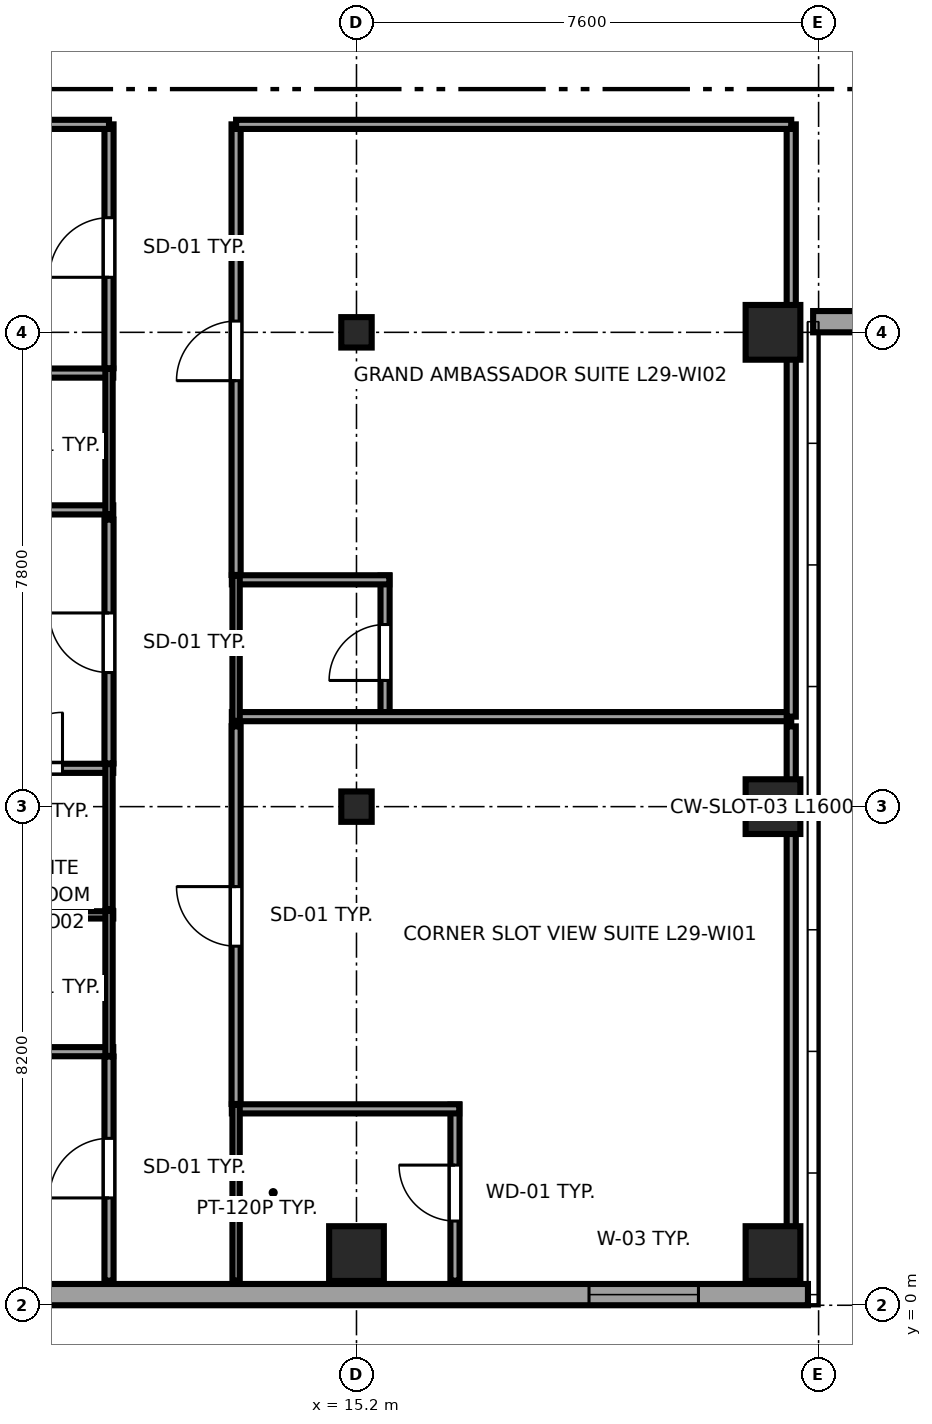
"""IFC4 building model, lengths in metres.
Left out: names, types, materials, properties, quantities, classifications, styles, units other than length and angle.
Written with IfcOpenShell. Run it as: python <this file> out.ifc"""

import sys

from ifc_helpers import new_model, si_unit, direction, frame, frame_2d, origin, origin_2d, place, context, subcontext, project, spatial, rectangle, i_section, extrude, source, transform, mapped, element, fill, save


model = new_model("IFC4")
c1 = context("Model", 3, precision=1e-05, world=origin(), true_north=direction((0.0, 1.0)))
c2 = subcontext(c1, "Body", "Model", "MODEL_VIEW")
j1 = project(units=[si_unit("LENGTHUNIT", "METRE"), si_unit("PLANEANGLEUNIT", "RADIAN")], contexts=[c1])
p1 = place(None, origin())
s1 = spatial("IfcSite", under=j1, at=p1, CompositionType="ELEMENT")
p2 = place(p1, origin())
s2 = spatial("IfcBuilding", under=s1, at=p2, CompositionType="ELEMENT")
p3 = place(p2, frame((0.0, 0.0, 115.1)))
s3 = spatial("IfcBuildingStorey", under=s2, at=p3, CompositionType="ELEMENT", Elevation=115.1)
m1 = source(origin(), c2, "Body", "SweptSolid", [
    extrude(rectangle(XDim=0.9, YDim=0.9, at=origin_2d()), origin(), (0.0, 0.0, 1.0), 3.55),
])
p4 = place(p3, frame((15.2, 0.85, 0.0), z_axis=(0.0, 0.0, 1.0), x_axis=(1.0, 0.0, 0.0)))
e1 = element("IfcColumn", 1, at=p4, inside=s3, PredefinedType="COLUMN", context=c2, shape_type="MappedRepresentation", body=[
    mapped(m1, transform((0.0, 0.0, 0.0), x_axis=(1.0, 0.0, 0.0), y_axis=(0.0, 1.0, 0.0), z_axis=(0.0, 0.0, 1.0), scale=1.0)),
])
m2 = source(origin(), c2, "Body", "SweptSolid", [
    extrude(i_section(OverallWidth=0.5, OverallDepth=0.5, WebThickness=0.022, FlangeThickness=0.034, at=origin_2d()), origin(), (0.0, 0.0, 1.0), 3.55),
])
for number, where, z_axis, x_axis in (
    (2, (15.2, 8.2, 0.0), (0.0, 0.0, 1.0), (1.0, 0.0, 0.0)),
    (3, (15.2, 16.0, 0.0), (0.0, 0.0, 1.0), (1.0, 0.0, 0.0)),
):
    element("IfcColumn", number, at=place(p3, frame(where, z_axis=z_axis, x_axis=x_axis)), inside=s3, PredefinedType="COLUMN", context=c2, shape_type="MappedRepresentation", body=[
        mapped(m2, transform((0.0, 0.0, 0.0), x_axis=(1.0, 0.0, 0.0), y_axis=(0.0, 1.0, 0.0), z_axis=(0.0, 0.0, 1.0), scale=1.0)),
    ])
for number, where, z_axis, x_axis in (
    (4, (22.05, 0.85, 0.0), (0.0, 0.0, 1.0), (1.0, 0.0, 0.0)),
    (5, (22.05, 8.2, 0.0), (0.0, 0.0, 1.0), (1.0, 0.0, 0.0)),
    (6, (22.05, 16.0, 0.0), (0.0, 0.0, 1.0), (1.0, 0.0, 0.0)),
):
    element("IfcColumn", number, at=place(p3, frame(where, z_axis=z_axis, x_axis=x_axis)), inside=s3, PredefinedType="COLUMN", context=c2, shape_type="MappedRepresentation", body=[
        mapped(m1, transform((0.0, 0.0, 0.0), x_axis=(1.0, 0.0, 0.0), y_axis=(0.0, 1.0, 0.0), z_axis=(0.0, 0.0, 1.0), scale=1.0)),
    ])
p5 = place(p3, frame((4.617, 0.175, 0.0), z_axis=(0.0, 0.0, 1.0), x_axis=(1.0, 0.0, 0.0)))
e7 = element("IfcWall", 7, at=p5, inside=s3, PredefinedType="SOLIDWALL", context=c2, shape_type="SweptSolid", body=[
    extrude(rectangle(XDim=18.008, YDim=0.35, at=frame_2d((9.004, 0.0))), origin(), (0.0, 0.0, 1.0), 3.37),
])
p6 = place(p5, frame((14.407, 0.0, 0.68)))
e8 = element("IfcOpeningElement", 8, at=p6, cuts=e7, PredefinedType="OPENING", context=c2, shape_type="SweptSolid", body=[
    extrude(rectangle(XDim=1.8, YDim=1.85, at=frame_2d((0.9, 0.925))), frame((0.0, 0.185, 0.0), z_axis=(0.0, -1.0, 0.0), x_axis=(1.0, 0.0, 0.0)), (0.0, 0.0, 1.0), 0.37),
])
p7 = place(p5, frame((2.591, 0.0, 0.62)))
e9 = element("IfcOpeningElement", 9, at=p7, cuts=e7, PredefinedType="OPENING", context=c2, shape_type="SweptSolid", body=[
    extrude(rectangle(XDim=1.5, YDim=1.55, at=frame_2d((0.75, 0.775))), frame((0.0, 0.185, 0.0), z_axis=(0.0, -1.0, 0.0), x_axis=(1.0, 0.0, 0.0)), (0.0, 0.0, 1.0), 0.37),
])
p8 = place(p3, frame((22.71, 16.175, 0.0), z_axis=(0.0, 0.0, 1.0), x_axis=(1.0, 0.0, 0.0)))
e10 = element("IfcWall", 10, at=p8, inside=s3, PredefinedType="SOLIDWALL", context=c2, shape_type="SweptSolid", body=[
    extrude(rectangle(XDim=11.58, YDim=0.35, at=frame_2d((5.79, 0.0))), origin(), (0.0, 0.0, 1.0), 2.748),
])
p9 = place(p8, frame((2.295, 0.0, 0.68)))
e11 = element("IfcOpeningElement", 11, at=p9, cuts=e10, PredefinedType="OPENING", context=c2, shape_type="SweptSolid", body=[
    extrude(rectangle(XDim=1.8, YDim=1.85, at=frame_2d((0.9, 0.925))), frame((0.0, 0.185, 0.0), z_axis=(0.0, -1.0, 0.0), x_axis=(1.0, 0.0, 0.0)), (0.0, 0.0, 1.0), 0.37),
])
p10 = place(p8, frame((7.485, 0.0, 0.68)))
e12 = element("IfcOpeningElement", 12, at=p10, cuts=e10, PredefinedType="OPENING", context=c2, shape_type="SweptSolid", body=[
    extrude(rectangle(XDim=1.8, YDim=1.85, at=frame_2d((0.9, 0.925))), frame((0.0, 0.185, 0.0), z_axis=(0.0, -1.0, 0.0), x_axis=(1.0, 0.0, 0.0)), (0.0, 0.0, 1.0), 0.37),
])
p11 = place(p3, frame((8.61, 4.17, 0.0), z_axis=(0.0, 0.0, 1.0), x_axis=(1.0, 0.0, 0.0)))
e13 = element("IfcWall", 13, at=p11, inside=s3, PredefinedType="PARTITIONING", context=c2, shape_type="SweptSolid", body=[
    extrude(rectangle(XDim=2.59, YDim=0.15, at=frame_2d((1.295, 0.0))), origin(), (0.0, 0.0, 1.0), 3.37),
])
p12 = place(p3, frame((8.61, 6.42, 0.0), z_axis=(0.0, 0.0, 1.0), x_axis=(1.0, 0.0, 0.0)))
e14 = element("IfcWall", 14, at=p12, inside=s3, PredefinedType="PLUMBINGWALL", context=c2, shape_type="SweptSolid", body=[
    extrude(rectangle(XDim=2.59, YDim=0.12, at=frame_2d((1.295, 0.0))), origin(), (0.0, 0.0, 1.0), 3.37),
])
p13 = place(p3, frame((11.13, 4.1, 0.0), z_axis=(0.0, 0.0, 1.0), x_axis=(0.0, 1.0, 0.0)))
e15 = element("IfcWall", 15, at=p13, inside=s3, PredefinedType="PLUMBINGWALL", context=c2, shape_type="SweptSolid", body=[
    extrude(rectangle(XDim=2.39, YDim=0.12, at=frame_2d((1.195, 0.0))), origin(), (0.0, 0.0, 1.0), 3.37),
])
p14 = place(p3, frame((8.61, 8.83, 0.0), z_axis=(0.0, 0.0, 1.0), x_axis=(1.0, 0.0, 0.0)))
e16 = element("IfcWall", 16, at=p14, inside=s3, PredefinedType="PARTITIONING", context=c2, shape_type="SweptSolid", body=[
    extrude(rectangle(XDim=2.59, YDim=0.15, at=frame_2d((1.295, 0.0))), origin(), (0.0, 0.0, 1.0), 3.37),
])
p15 = place(p14, frame((0.835, 0.0, 0.0)))
e17 = element("IfcOpeningElement", 17, at=p15, cuts=e16, PredefinedType="OPENING", context=c2, shape_type="SweptSolid", body=[
    extrude(rectangle(XDim=0.92, YDim=2.01, at=frame_2d((0.46, 1.005))), frame((0.0, 0.085, 0.0), z_axis=(0.0, -1.0, 0.0), x_axis=(1.0, 0.0, 0.0)), (0.0, 0.0, 1.0), 0.17),
])
p16 = place(p3, frame((11.13, 6.51, 0.0), z_axis=(0.0, 0.0, 1.0), x_axis=(0.0, 1.0, 0.0)))
e18 = element("IfcWall", 18, at=p16, inside=s3, PredefinedType="PLUMBINGWALL", context=c2, shape_type="SweptSolid", body=[
    extrude(rectangle(XDim=2.39, YDim=0.12, at=frame_2d((1.195, 0.0))), origin(), (0.0, 0.0, 1.0), 3.37),
])
p17 = place(p3, frame((0.405, 13.08, 0.0), z_axis=(0.0, 0.0, 1.0), x_axis=(1.0, 0.0, 0.0)))
e19 = element("IfcWall", 19, at=p17, inside=s3, PredefinedType="PARTITIONING", context=c2, shape_type="SweptSolid", body=[
    extrude(rectangle(XDim=10.795, YDim=0.15, at=frame_2d((5.397, 0.0))), origin(), (0.0, 0.0, 1.0), 3.37),
])
p18 = place(p3, frame((8.61, 15.33, 0.0), z_axis=(0.0, 0.0, 1.0), x_axis=(1.0, 0.0, 0.0)))
e20 = element("IfcWall", 20, at=p18, inside=s3, PredefinedType="PARTITIONING", context=c2, shape_type="SweptSolid", body=[
    extrude(rectangle(XDim=2.59, YDim=0.15, at=frame_2d((1.295, 0.0))), origin(), (0.0, 0.0, 1.0), 3.37),
])
p19 = place(p3, frame((11.13, 13.01, 0.0), z_axis=(0.0, 0.0, 1.0), x_axis=(0.0, 1.0, 0.0)))
e21 = element("IfcWall", 21, at=p19, inside=s3, PredefinedType="PLUMBINGWALL", context=c2, shape_type="SweptSolid", body=[
    extrude(rectangle(XDim=2.39, YDim=0.12, at=frame_2d((1.195, 0.0))), origin(), (0.0, 0.0, 1.0), 3.37),
])
p20 = place(p3, frame((16.82, 0.405, 0.0), z_axis=(0.0, 0.0, 1.0), x_axis=(0.0, 1.0, 0.0)))
e22 = element("IfcWall", 22, at=p20, inside=s3, PredefinedType="PARTITIONING", context=c2, shape_type="SweptSolid", body=[
    extrude(rectangle(XDim=2.895, YDim=0.15, at=frame_2d((1.448, 0.0))), origin(), (0.0, 0.0, 1.0), 3.37),
])
p21 = place(p20, frame((0.98, 0.0, 0.0)))
e23 = element("IfcOpeningElement", 23, at=p21, cuts=e22, PredefinedType="OPENING", context=c2, shape_type="SweptSolid", body=[
    extrude(rectangle(XDim=0.92, YDim=2.01, at=frame_2d((0.46, 1.005))), frame((0.0, 0.085, 0.0), z_axis=(0.0, -1.0, 0.0), x_axis=(1.0, 0.0, 0.0)), (0.0, 0.0, 1.0), 0.17),
])
p22 = place(p3, frame((13.15, 3.23, 0.0), z_axis=(0.0, 0.0, 1.0), x_axis=(1.0, 0.0, 0.0)))
e24 = element("IfcWall", 24, at=p22, inside=s3, PredefinedType="PARTITIONING", context=c2, shape_type="SweptSolid", body=[
    extrude(rectangle(XDim=3.74, YDim=0.15, at=frame_2d((1.87, 0.0))), origin(), (0.0, 0.0, 1.0), 3.37),
])
p23 = place(p3, frame((13.22, 0.405, 0.0), z_axis=(0.0, 0.0, 1.0), x_axis=(0.0, 1.0, 0.0)))
e25 = element("IfcWall", 25, at=p23, inside=s3, PredefinedType="PLUMBINGWALL", context=c2, shape_type="SweptSolid", body=[
    extrude(rectangle(XDim=2.895, YDim=0.12, at=frame_2d((1.448, 0.0))), origin(), (0.0, 0.0, 1.0), 3.37),
])
p24 = place(p3, frame((15.67, 9.61, 0.0), z_axis=(0.0, 0.0, 1.0), x_axis=(0.0, 1.0, 0.0)))
e26 = element("IfcWall", 26, at=p24, inside=s3, PredefinedType="PARTITIONING", context=c2, shape_type="SweptSolid", body=[
    extrude(rectangle(XDim=2.39, YDim=0.15, at=frame_2d((1.195, 0.0))), origin(), (0.0, 0.0, 1.0), 3.37),
])
p25 = place(p24, frame((0.665, 0.0, 0.0)))
e27 = element("IfcOpeningElement", 27, at=p25, cuts=e26, PredefinedType="OPENING", context=c2, shape_type="SweptSolid", body=[
    extrude(rectangle(XDim=0.92, YDim=2.01, at=frame_2d((0.46, 1.005))), frame((0.0, 0.085, 0.0), z_axis=(0.0, -1.0, 0.0), x_axis=(1.0, 0.0, 0.0)), (0.0, 0.0, 1.0), 0.17),
])
p26 = place(p3, frame((13.15, 9.68, 0.0), z_axis=(0.0, 0.0, 1.0), x_axis=(1.0, 0.0, 0.0)))
e28 = element("IfcWall", 28, at=p26, inside=s3, PredefinedType="PARTITIONING", context=c2, shape_type="SweptSolid", body=[
    extrude(rectangle(XDim=9.2, YDim=0.15, at=frame_2d((4.6, 0.0))), origin(), (0.0, 0.0, 1.0), 3.37),
])
p27 = place(p3, frame((13.15, 11.93, 0.0), z_axis=(0.0, 0.0, 1.0), x_axis=(1.0, 0.0, 0.0)))
e29 = element("IfcWall", 29, at=p27, inside=s3, PredefinedType="PARTITIONING", context=c2, shape_type="SweptSolid", body=[
    extrude(rectangle(XDim=2.59, YDim=0.15, at=frame_2d((1.295, 0.0))), origin(), (0.0, 0.0, 1.0), 3.37),
])
p28 = place(p3, frame((13.22, 9.61, 0.0), z_axis=(0.0, 0.0, 1.0), x_axis=(0.0, 1.0, 0.0)))
e30 = element("IfcWall", 30, at=p28, inside=s3, PredefinedType="PLUMBINGWALL", context=c2, shape_type="SweptSolid", body=[
    extrude(rectangle(XDim=2.39, YDim=0.12, at=frame_2d((1.195, 0.0))), origin(), (0.0, 0.0, 1.0), 3.37),
])
p29 = place(p3, frame((11.13, 0.405, 0.0), z_axis=(0.0, 0.0, 1.0), x_axis=(0.0, 1.0, 0.0)))
e31 = element("IfcWall", 31, at=p29, inside=s3, PredefinedType="PARTITIONING", context=c2, shape_type="SweptSolid", body=[
    extrude(rectangle(XDim=3.685, YDim=0.15, at=frame_2d((1.843, 0.0))), origin(), (0.0, 0.0, 1.0), 3.37),
])
p30 = place(p29, frame((1.36, 0.0, 0.0)))
e32 = element("IfcOpeningElement", 32, at=p30, cuts=e31, PredefinedType="OPENING", context=c2, shape_type="SweptSolid", body=[
    extrude(rectangle(XDim=0.98, YDim=2.12, at=frame_2d((0.49, 1.06))), frame((0.0, 0.085, 0.0), z_axis=(0.0, -1.0, 0.0), x_axis=(1.0, 0.0, 0.0)), (0.0, 0.0, 1.0), 0.17),
])
p31 = place(p3, frame((11.13, 8.91, 0.0), z_axis=(0.0, 0.0, 1.0), x_axis=(0.0, 1.0, 0.0)))
e33 = element("IfcWall", 33, at=p31, inside=s3, PredefinedType="PARTITIONING", context=c2, shape_type="SweptSolid", body=[
    extrude(rectangle(XDim=4.01, YDim=0.15, at=frame_2d((2.005, 0.0))), origin(), (0.0, 0.0, 1.0), 3.37),
])
p32 = place(p31, frame((1.495, 0.0, 0.0)))
e34 = element("IfcOpeningElement", 34, at=p32, cuts=e33, PredefinedType="OPENING", context=c2, shape_type="SweptSolid", body=[
    extrude(rectangle(XDim=0.98, YDim=2.12, at=frame_2d((0.49, 1.06))), frame((0.0, 0.085, 0.0), z_axis=(0.0, -1.0, 0.0), x_axis=(1.0, 0.0, 0.0)), (0.0, 0.0, 1.0), 0.17),
])
p33 = place(p3, frame((11.13, 15.41, 0.0), z_axis=(0.0, 0.0, 1.0), x_axis=(0.0, 1.0, 0.0)))
e35 = element("IfcWall", 35, at=p33, inside=s3, PredefinedType="PARTITIONING", context=c2, shape_type="SweptSolid", body=[
    extrude(rectangle(XDim=4.01, YDim=0.15, at=frame_2d((2.005, 0.0))), origin(), (0.0, 0.0, 1.0), 3.37),
])
p34 = place(p33, frame((1.495, 0.0, 0.0)))
e36 = element("IfcOpeningElement", 36, at=p34, cuts=e35, PredefinedType="OPENING", context=c2, shape_type="SweptSolid", body=[
    extrude(rectangle(XDim=0.98, YDim=2.12, at=frame_2d((0.49, 1.06))), frame((0.0, 0.085, 0.0), z_axis=(0.0, -1.0, 0.0), x_axis=(1.0, 0.0, 0.0)), (0.0, 0.0, 1.0), 0.17),
])
p35 = place(p3, frame((0.405, 19.42, 0.0), z_axis=(0.0, 0.0, 1.0), x_axis=(1.0, 0.0, 0.0)))
e37 = element("IfcWall", 37, at=p35, inside=s3, PredefinedType="PARTITIONING", context=c2, shape_type="SweptSolid", body=[
    extrude(rectangle(XDim=10.725, YDim=0.15, at=frame_2d((5.362, 0.0))), origin(), (0.0, 0.0, 1.0), 3.37),
])
p36 = place(p3, frame((13.22, 3.31, 0.0), z_axis=(0.0, 0.0, 1.0), x_axis=(0.0, 1.0, 0.0)))
e38 = element("IfcWall", 38, at=p36, inside=s3, PredefinedType="PARTITIONING", context=c2, shape_type="SweptSolid", body=[
    extrude(rectangle(XDim=6.21, YDim=0.15, at=frame_2d((3.105, 0.0))), origin(), (0.0, 0.0, 1.0), 3.37),
])
p37 = place(p36, frame((2.595, 0.0, 0.0)))
e39 = element("IfcOpeningElement", 39, at=p37, cuts=e38, PredefinedType="OPENING", context=c2, shape_type="SweptSolid", body=[
    extrude(rectangle(XDim=0.98, YDim=2.12, at=frame_2d((0.49, 1.06))), frame((0.0, 0.085, 0.0), z_axis=(0.0, -1.0, 0.0), x_axis=(1.0, 0.0, 0.0)), (0.0, 0.0, 1.0), 0.17),
])
p38 = place(p3, frame((22.35, 0.405, 0.0), z_axis=(0.0, 0.0, 1.0), x_axis=(0.0, 1.0, 0.0)))
e40 = element("IfcWall", 40, at=p38, inside=s3, PredefinedType="PARTITIONING", context=c2, shape_type="SweptSolid", body=[
    extrude(rectangle(XDim=9.115, YDim=0.15, at=frame_2d((4.558, 0.0))), origin(), (0.0, 0.0, 1.0), 3.37),
])
p39 = place(p3, frame((13.22, 12.01, 0.0), z_axis=(0.0, 0.0, 1.0), x_axis=(0.0, 1.0, 0.0)))
e41 = element("IfcWall", 41, at=p39, inside=s3, PredefinedType="PARTITIONING", context=c2, shape_type="SweptSolid", body=[
    extrude(rectangle(XDim=7.41, YDim=0.15, at=frame_2d((3.705, 0.0))), origin(), (0.0, 0.0, 1.0), 3.37),
])
p40 = place(p39, frame((3.195, 0.0, 0.0)))
e42 = element("IfcOpeningElement", 42, at=p40, cuts=e41, PredefinedType="OPENING", context=c2, shape_type="SweptSolid", body=[
    extrude(rectangle(XDim=0.98, YDim=2.12, at=frame_2d((0.49, 1.06))), frame((0.0, 0.085, 0.0), z_axis=(0.0, -1.0, 0.0), x_axis=(1.0, 0.0, 0.0)), (0.0, 0.0, 1.0), 0.17),
])
p41 = place(p3, frame((22.35, 9.68, 0.0), z_axis=(0.0, 0.0, 1.0), x_axis=(0.0, 1.0, 0.0)))
e43 = element("IfcWall", 43, at=p41, inside=s3, PredefinedType="PARTITIONING", context=c2, shape_type="SweptSolid", body=[
    extrude(rectangle(XDim=9.74, YDim=0.15, at=frame_2d((4.87, 0.0))), origin(), (0.0, 0.0, 1.0), 3.37),
])
p42 = place(p3, frame((13.22, 19.42, 0.0), z_axis=(0.0, 0.0, 1.0), x_axis=(1.0, 0.0, 0.0)))
e44 = element("IfcWall", 44, at=p42, inside=s3, PredefinedType="PARTITIONING", context=c2, shape_type="SweptSolid", body=[
    extrude(rectangle(XDim=9.13, YDim=0.15, at=frame_2d((4.565, 0.0))), origin(), (0.0, 0.0, 1.0), 3.37),
])
m3 = source(origin(), c2, "Body", "SweptSolid", [
    extrude(rectangle(XDim=1.8, YDim=1.85, at=frame_2d((0.9, 0.925))), frame((0.0, 0.09, 0.0), z_axis=(0.0, -1.0, 0.0), x_axis=(1.0, 0.0, 0.0)), (0.0, 0.0, 1.0), 0.06),
])
p43 = place(p6, origin())
e45 = element("IfcWindow", 45, at=p43, inside=s3, PartitioningType="TRIPLE_PANEL_HORIZONTAL", PredefinedType="WINDOW", context=c2, shape_type="MappedRepresentation", body=[
    mapped(m3, transform((0.0, 0.0, 0.0), x_axis=(1.0, 0.0, 0.0), y_axis=(0.0, 1.0, 0.0), z_axis=(0.0, 0.0, 1.0), scale=1.0)),
])
fill(e8, e45)
m4 = source(origin(), c2, "Body", "SweptSolid", [
    extrude(rectangle(XDim=0.92, YDim=2.01, at=frame_2d((0.46, 1.005))), frame((0.0, 0.025, 0.0), z_axis=(0.0, -1.0, 0.0), x_axis=(1.0, 0.0, 0.0)), (0.0, 0.0, 1.0), 0.05),
])
p44 = place(p15, origin())
e46 = element("IfcDoor", 46, at=p44, inside=s3, OperationType="SINGLE_SWING_RIGHT", PredefinedType="DOOR", context=c2, shape_type="MappedRepresentation", body=[
    mapped(m4, transform((0.0, 0.0, 0.0), x_axis=(1.0, 0.0, 0.0), y_axis=(0.0, 1.0, 0.0), z_axis=(0.0, 0.0, 1.0), scale=1.0)),
])
fill(e17, e46)
p45 = place(p21, origin())
e47 = element("IfcDoor", 47, at=p45, inside=s3, OperationType="SINGLE_SWING_RIGHT", PredefinedType="DOOR", context=c2, shape_type="MappedRepresentation", body=[
    mapped(m4, transform((0.0, 0.0, 0.0), x_axis=(1.0, 0.0, 0.0), y_axis=(0.0, 1.0, 0.0), z_axis=(0.0, 0.0, 1.0), scale=1.0)),
])
fill(e23, e47)
p46 = place(p25, origin())
e48 = element("IfcDoor", 48, at=p46, inside=s3, OperationType="SINGLE_SWING_LEFT", PredefinedType="DOOR", context=c2, shape_type="MappedRepresentation", body=[
    mapped(m4, transform((0.0, 0.0, 0.0), x_axis=(1.0, 0.0, 0.0), y_axis=(0.0, 1.0, 0.0), z_axis=(0.0, 0.0, 1.0), scale=1.0)),
])
fill(e27, e48)
m5 = source(origin(), c2, "Body", "SweptSolid", [
    extrude(rectangle(XDim=0.98, YDim=2.12, at=frame_2d((0.49, 1.06))), frame((0.0, 0.025, 0.0), z_axis=(0.0, -1.0, 0.0), x_axis=(1.0, 0.0, 0.0)), (0.0, 0.0, 1.0), 0.05),
])
p47 = place(p30, origin())
e49 = element("IfcDoor", 49, at=p47, inside=s3, OperationType="SINGLE_SWING_LEFT", PredefinedType="DOOR", context=c2, shape_type="MappedRepresentation", body=[
    mapped(m5, transform((0.0, 0.0, 0.0), x_axis=(1.0, 0.0, 0.0), y_axis=(0.0, 1.0, 0.0), z_axis=(0.0, 0.0, 1.0), scale=1.0)),
])
fill(e32, e49)
p48 = place(p32, origin())
e50 = element("IfcDoor", 50, at=p48, inside=s3, OperationType="SINGLE_SWING_RIGHT", PredefinedType="DOOR", context=c2, shape_type="MappedRepresentation", body=[
    mapped(m5, transform((0.0, 0.0, 0.0), x_axis=(1.0, 0.0, 0.0), y_axis=(0.0, 1.0, 0.0), z_axis=(0.0, 0.0, 1.0), scale=1.0)),
])
fill(e34, e50)
p49 = place(p34, origin())
e51 = element("IfcDoor", 51, at=p49, inside=s3, OperationType="SINGLE_SWING_LEFT", PredefinedType="DOOR", context=c2, shape_type="MappedRepresentation", body=[
    mapped(m5, transform((0.0, 0.0, 0.0), x_axis=(1.0, 0.0, 0.0), y_axis=(0.0, 1.0, 0.0), z_axis=(0.0, 0.0, 1.0), scale=1.0)),
])
fill(e36, e51)
p50 = place(p37, origin())
e52 = element("IfcDoor", 52, at=p50, inside=s3, OperationType="SINGLE_SWING_RIGHT", PredefinedType="DOOR", context=c2, shape_type="MappedRepresentation", body=[
    mapped(m5, transform((0.0, 0.0, 0.0), x_axis=(1.0, 0.0, 0.0), y_axis=(0.0, 1.0, 0.0), z_axis=(0.0, 0.0, 1.0), scale=1.0)),
])
fill(e39, e52)
p51 = place(p40, origin())
e53 = element("IfcDoor", 53, at=p51, inside=s3, OperationType="SINGLE_SWING_LEFT", PredefinedType="DOOR", context=c2, shape_type="MappedRepresentation", body=[
    mapped(m5, transform((0.0, 0.0, 0.0), x_axis=(1.0, 0.0, 0.0), y_axis=(0.0, 1.0, 0.0), z_axis=(0.0, 0.0, 1.0), scale=1.0)),
])
fill(e42, e53)
save(model, sys.argv[1])
